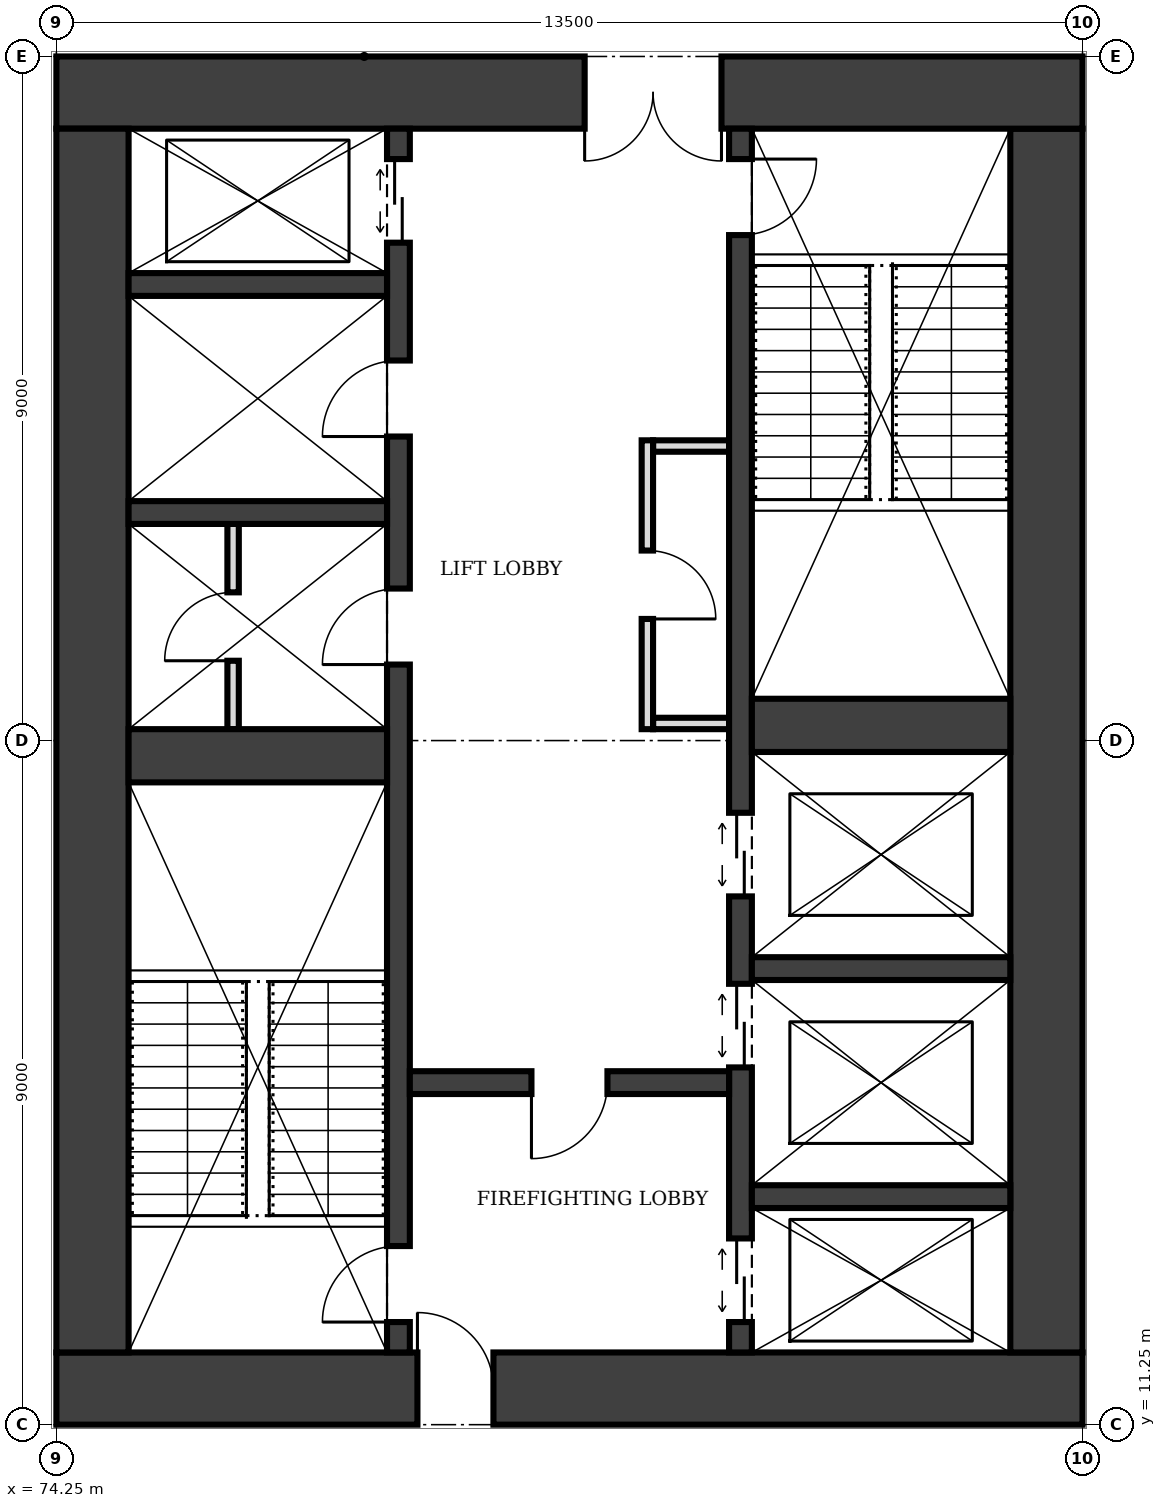
"""IFC4 building model, lengths in metres.
Left out: names, types, materials, properties, quantities, classifications, styles, units other than length and angle.
Written with IfcOpenShell. Run it as: python <this file> out.ifc"""

import sys

from ifc_helpers import new_model, si_unit, direction, frame, frame_2d, origin, place, context, subcontext, project, spatial, rectangle, extrude, element, fill, save


model = new_model("IFC4")
c1 = context("Model", 3, precision=1e-05, world=origin(), true_north=direction((0.0, 1.0)))
c2 = subcontext(c1, "Body", "Model", "MODEL_VIEW")
j1 = project(units=[si_unit("LENGTHUNIT", "METRE"), si_unit("PLANEANGLEUNIT", "RADIAN")], contexts=[c1])
p1 = place(None, origin())
s1 = spatial("IfcSite", under=j1, at=p1, CompositionType="ELEMENT")
p2 = place(p1, origin())
s2 = spatial("IfcBuilding", under=s1, at=p2, CompositionType="ELEMENT")
p3 = place(p2, frame((0.0, 0.0, 129.0)))
s3 = spatial("IfcBuildingStorey", under=s2, at=p3, CompositionType="ELEMENT", Elevation=129.0)
p4 = place(p3, frame((74.25, 11.725, 0.0), z_axis=(0.0, 0.0, 1.0), x_axis=(1.0, 0.0, 0.0)))
e1 = element("IfcWall", 1, at=p4, inside=s3, PredefinedType="SHEAR", context=c2, shape_type="SweptSolid", body=[
    extrude(rectangle(XDim=13.5, YDim=0.95, at=frame_2d((6.75, 0.0))), origin(), (0.0, 0.0, 1.0), 4.0),
])
p5 = place(p4, frame((4.75, 0.0, 0.0)))
e2 = element("IfcOpeningElement", 2, at=p5, cuts=e1, PredefinedType="OPENING", context=c2, shape_type="SweptSolid", body=[
    extrude(rectangle(XDim=1.0, YDim=2.1, at=frame_2d((0.5, 1.05))), frame((0.0, 0.485, 0.0), z_axis=(0.0, -1.0, 0.0), x_axis=(1.0, 0.0, 0.0)), (0.0, 0.0, 1.0), 0.97),
])
p6 = place(p3, frame((87.275, 12.2, 0.0), z_axis=(0.0, 0.0, 1.0), x_axis=(0.0, 1.0, 0.0)))
e3 = element("IfcWall", 3, at=p6, inside=s3, PredefinedType="SHEAR", context=c2, shape_type="SweptSolid", body=[
    extrude(rectangle(XDim=16.1, YDim=0.95, at=frame_2d((8.05, 0.0))), origin(), (0.0, 0.0, 1.0), 4.0),
])
p7 = place(p3, frame((87.75, 28.775, 0.0), z_axis=(0.0, 0.0, 1.0), x_axis=(-1.0, 0.0, 0.0)))
e4 = element("IfcWall", 4, at=p7, inside=s3, PredefinedType="SHEAR", context=c2, shape_type="SweptSolid", body=[
    extrude(rectangle(XDim=13.5, YDim=0.95, at=frame_2d((6.75, 0.0))), origin(), (0.0, 0.0, 1.0), 4.0),
])
p8 = place(p7, frame((4.75, 0.0, 0.0)))
e5 = element("IfcOpeningElement", 5, at=p8, cuts=e4, PredefinedType="OPENING", context=c2, shape_type="SweptSolid", body=[
    extrude(rectangle(XDim=1.8, YDim=2.1, at=frame_2d((0.9, 1.05))), frame((0.0, 0.485, 0.0), z_axis=(0.0, -1.0, 0.0), x_axis=(1.0, 0.0, 0.0)), (0.0, 0.0, 1.0), 0.97),
])
p9 = place(p3, frame((74.725, 28.3, 0.0), z_axis=(0.0, 0.0, 1.0), x_axis=(0.0, -1.0, 0.0)))
e6 = element("IfcWall", 6, at=p9, inside=s3, PredefinedType="SHEAR", context=c2, shape_type="SweptSolid", body=[
    extrude(rectangle(XDim=16.1, YDim=0.95, at=frame_2d((8.05, 0.0))), origin(), (0.0, 0.0, 1.0), 4.0),
])
p10 = place(p3, frame((78.75, 12.2, 0.0), z_axis=(0.0, 0.0, 1.0), x_axis=(0.0, 1.0, 0.0)))
e7 = element("IfcWall", 7, at=p10, inside=s3, PredefinedType="SHEAR", context=c2, shape_type="SweptSolid", body=[
    extrude(rectangle(XDim=16.1, YDim=0.3, at=frame_2d((8.05, 0.0))), origin(), (0.0, 0.0, 1.0), 4.0),
])
p11 = place(p10, frame((0.4, 0.0, 0.0)))
e8 = element("IfcOpeningElement", 8, at=p11, cuts=e7, PredefinedType="OPENING", context=c2, shape_type="SweptSolid", body=[
    extrude(rectangle(XDim=1.0, YDim=2.1, at=frame_2d((0.5, 1.05))), frame((0.0, 0.16, 0.0), z_axis=(0.0, -1.0, 0.0), x_axis=(1.0, 0.0, 0.0)), (0.0, 0.0, 1.0), 0.32),
])
p12 = place(p10, frame((14.6, 0.0, 0.0)))
e9 = element("IfcOpeningElement", 9, at=p12, cuts=e7, PredefinedType="OPENING", context=c2, shape_type="SweptSolid", body=[
    extrude(rectangle(XDim=1.1, YDim=2.1, at=frame_2d((0.55, 1.05))), frame((0.0, 0.16, 0.0), z_axis=(0.0, -1.0, 0.0), x_axis=(1.0, 0.0, 0.0)), (0.0, 0.0, 1.0), 0.32),
])
p13 = place(p10, frame((9.05, 0.0, 0.0)))
e10 = element("IfcOpeningElement", 10, at=p13, cuts=e7, PredefinedType="OPENING", context=c2, shape_type="SweptSolid", body=[
    extrude(rectangle(XDim=1.0, YDim=2.1, at=frame_2d((0.5, 1.05))), frame((0.0, 0.16, 0.0), z_axis=(0.0, -1.0, 0.0), x_axis=(1.0, 0.0, 0.0)), (0.0, 0.0, 1.0), 0.32),
])
p14 = place(p10, frame((12.05, 0.0, 0.0)))
e11 = element("IfcOpeningElement", 11, at=p14, cuts=e7, PredefinedType="OPENING", context=c2, shape_type="SweptSolid", body=[
    extrude(rectangle(XDim=1.0, YDim=2.1, at=frame_2d((0.5, 1.05))), frame((0.0, 0.16, 0.0), z_axis=(0.0, -1.0, 0.0), x_axis=(1.0, 0.0, 0.0)), (0.0, 0.0, 1.0), 0.32),
])
p15 = place(p3, frame((83.25, 12.2, 0.0), z_axis=(0.0, 0.0, 1.0), x_axis=(0.0, 1.0, 0.0)))
e12 = element("IfcWall", 12, at=p15, inside=s3, PredefinedType="SHEAR", context=c2, shape_type="SweptSolid", body=[
    extrude(rectangle(XDim=16.1, YDim=0.3, at=frame_2d((8.05, 0.0))), origin(), (0.0, 0.0, 1.0), 4.0),
])
p16 = place(p15, frame((14.7, 0.0, 0.0)))
e13 = element("IfcOpeningElement", 13, at=p16, cuts=e12, PredefinedType="OPENING", context=c2, shape_type="SweptSolid", body=[
    extrude(rectangle(XDim=1.0, YDim=2.1, at=frame_2d((0.5, 1.05))), frame((0.0, 0.16, 0.0), z_axis=(0.0, -1.0, 0.0), x_axis=(1.0, 0.0, 0.0)), (0.0, 0.0, 1.0), 0.32),
])
p17 = place(p15, frame((0.4, 0.0, 0.0)))
e14 = element("IfcOpeningElement", 14, at=p17, cuts=e12, PredefinedType="OPENING", context=c2, shape_type="SweptSolid", body=[
    extrude(rectangle(XDim=1.1, YDim=2.1, at=frame_2d((0.55, 1.05))), frame((0.0, 0.16, 0.0), z_axis=(0.0, -1.0, 0.0), x_axis=(1.0, 0.0, 0.0)), (0.0, 0.0, 1.0), 0.32),
])
p18 = place(p15, frame((3.75, 0.0, 0.0)))
e15 = element("IfcOpeningElement", 15, at=p18, cuts=e12, PredefinedType="OPENING", context=c2, shape_type="SweptSolid", body=[
    extrude(rectangle(XDim=1.1, YDim=2.1, at=frame_2d((0.55, 1.05))), frame((0.0, 0.16, 0.0), z_axis=(0.0, -1.0, 0.0), x_axis=(1.0, 0.0, 0.0)), (0.0, 0.0, 1.0), 0.32),
])
p19 = place(p15, frame((6.0, 0.0, 0.0)))
e16 = element("IfcOpeningElement", 16, at=p19, cuts=e12, PredefinedType="OPENING", context=c2, shape_type="SweptSolid", body=[
    extrude(rectangle(XDim=1.1, YDim=2.1, at=frame_2d((0.55, 1.05))), frame((0.0, 0.16, 0.0), z_axis=(0.0, -1.0, 0.0), x_axis=(1.0, 0.0, 0.0)), (0.0, 0.0, 1.0), 0.32),
])
p20 = place(p3, frame((75.2, 20.05, 0.0), z_axis=(0.0, 0.0, 1.0), x_axis=(1.0, 0.0, 0.0)))
e17 = element("IfcWall", 17, at=p20, inside=s3, PredefinedType="SHEAR", context=c2, shape_type="SweptSolid", body=[
    extrude(rectangle(XDim=3.4, YDim=0.7, at=frame_2d((1.7, 0.0))), origin(), (0.0, 0.0, 1.0), 4.0),
])
p21 = place(p3, frame((78.9, 15.75, 0.0), z_axis=(0.0, 0.0, 1.0), x_axis=(1.0, 0.0, 0.0)))
e18 = element("IfcWall", 18, at=p21, inside=s3, PredefinedType="SHEAR", context=c2, shape_type="SweptSolid", body=[
    extrude(rectangle(XDim=4.2, YDim=0.3, at=frame_2d((2.1, 0.0))), origin(), (0.0, 0.0, 1.0), 4.0),
])
p22 = place(p21, frame((1.6, 0.0, 0.0)))
e19 = element("IfcOpeningElement", 19, at=p22, cuts=e18, PredefinedType="OPENING", context=c2, shape_type="SweptSolid", body=[
    extrude(rectangle(XDim=1.0, YDim=2.1, at=frame_2d((0.5, 1.05))), frame((0.0, 0.16, 0.0), z_axis=(0.0, -1.0, 0.0), x_axis=(1.0, 0.0, 0.0)), (0.0, 0.0, 1.0), 0.32),
])
for number, where, z_axis, x_axis in (
    (20, (83.4, 14.25, 0.0), (0.0, 0.0, 1.0), (1.0, 0.0, 0.0)),
    (21, (83.4, 17.25, 0.0), (0.0, 0.0, 1.0), (1.0, 0.0, 0.0)),
):
    element("IfcWall", number, at=place(p3, frame(where, z_axis=z_axis, x_axis=x_axis)), inside=s3, PredefinedType="SHEAR", context=c2, shape_type="SweptSolid", body=[
        extrude(rectangle(XDim=3.4, YDim=0.3, at=frame_2d((1.7, 0.0))), origin(), (0.0, 0.0, 1.0), 4.0),
    ])
p23 = place(p3, frame((83.4, 20.45, 0.0), z_axis=(0.0, 0.0, 1.0), x_axis=(1.0, 0.0, 0.0)))
e22 = element("IfcWall", 22, at=p23, inside=s3, PredefinedType="SHEAR", context=c2, shape_type="SweptSolid", body=[
    extrude(rectangle(XDim=3.4, YDim=0.7, at=frame_2d((1.7, 0.0))), origin(), (0.0, 0.0, 1.0), 4.0),
])
for number, where, z_axis, x_axis in (
    (23, (75.2, 23.25, 0.0), (0.0, 0.0, 1.0), (1.0, 0.0, 0.0)),
    (24, (75.2, 26.25, 0.0), (0.0, 0.0, 1.0), (1.0, 0.0, 0.0)),
):
    element("IfcWall", number, at=place(p3, frame(where, z_axis=z_axis, x_axis=x_axis)), inside=s3, PredefinedType="SHEAR", context=c2, shape_type="SweptSolid", body=[
        extrude(rectangle(XDim=3.4, YDim=0.3, at=frame_2d((1.7, 0.0))), origin(), (0.0, 0.0, 1.0), 4.0),
    ])
p24 = place(p3, frame((82.025, 20.4, 0.0), z_axis=(0.0, 0.0, 1.0), x_axis=(0.0, 1.0, 0.0)))
e25 = element("IfcWall", 25, at=p24, inside=s3, PredefinedType="PARTITIONING", context=c2, shape_type="SweptSolid", body=[
    extrude(rectangle(XDim=3.8, YDim=0.15, at=frame_2d((1.9, 0.0))), origin(), (0.0, 0.0, 1.0), 3.75),
])
p25 = place(p24, frame((1.45, 0.0, 0.0)))
e26 = element("IfcOpeningElement", 26, at=p25, cuts=e25, PredefinedType="OPENING", context=c2, shape_type="SweptSolid", body=[
    extrude(rectangle(XDim=0.9, YDim=2.1, at=frame_2d((0.45, 1.05))), frame((0.0, 0.085, 0.0), z_axis=(0.0, -1.0, 0.0), x_axis=(1.0, 0.0, 0.0)), (0.0, 0.0, 1.0), 0.17),
])
for number, where, z_axis, x_axis in (
    (27, (82.1, 20.475, 0.0), (0.0, 0.0, 1.0), (1.0, 0.0, 0.0)),
    (28, (82.1, 24.125, 0.0), (0.0, 0.0, 1.0), (1.0, 0.0, 0.0)),
):
    element("IfcWall", number, at=place(p3, frame(where, z_axis=z_axis, x_axis=x_axis)), inside=s3, PredefinedType="PARTITIONING", context=c2, shape_type="SweptSolid", body=[
        extrude(rectangle(XDim=1.0, YDim=0.15, at=frame_2d((0.5, 0.0))), origin(), (0.0, 0.0, 1.0), 3.75),
    ])
p26 = place(p3, frame((76.575, 20.4, 0.0), z_axis=(0.0, 0.0, 1.0), x_axis=(0.0, 1.0, 0.0)))
e29 = element("IfcWall", 29, at=p26, inside=s3, PredefinedType="PARTITIONING", context=c2, shape_type="SweptSolid", body=[
    extrude(rectangle(XDim=2.7, YDim=0.15, at=frame_2d((1.35, 0.0))), origin(), (0.0, 0.0, 1.0), 3.75),
])
p27 = place(p26, frame((0.9, 0.0, 0.0)))
e30 = element("IfcOpeningElement", 30, at=p27, cuts=e29, PredefinedType="OPENING", context=c2, shape_type="SweptSolid", body=[
    extrude(rectangle(XDim=0.9, YDim=2.1, at=frame_2d((0.45, 1.05))), frame((0.0, 0.085, 0.0), z_axis=(0.0, -1.0, 0.0), x_axis=(1.0, 0.0, 0.0)), (0.0, 0.0, 1.0), 0.17),
])
p28 = place(p5, origin())
e31 = element("IfcDoor", 31, at=p28, inside=s3, OperationType="SINGLE_SWING_LEFT", PredefinedType="DOOR", context=c2, shape_type="SweptSolid", body=[
    extrude(rectangle(XDim=1.0, YDim=2.1, at=frame_2d((0.5, 1.05))), frame((0.0, 0.025, 0.0), z_axis=(0.0, -1.0, 0.0), x_axis=(1.0, 0.0, 0.0)), (0.0, 0.0, 1.0), 0.05),
])
fill(e2, e31)
p29 = place(p8, origin())
e32 = element("IfcDoor", 32, at=p29, inside=s3, OperationType="DOUBLE_DOOR_SINGLE_SWING", PredefinedType="DOOR", context=c2, shape_type="SweptSolid", body=[
    extrude(rectangle(XDim=1.8, YDim=2.1, at=frame_2d((0.9, 1.05))), frame((0.0, 0.025, 0.0), z_axis=(0.0, -1.0, 0.0), x_axis=(1.0, 0.0, 0.0)), (0.0, 0.0, 1.0), 0.05),
])
fill(e5, e32)
p30 = place(p22, frame((1.0, 0.0, 0.0), z_axis=(0.0, 0.0, 1.0), x_axis=(-1.0, 0.0, 0.0)))
e33 = element("IfcDoor", 33, at=p30, inside=s3, OperationType="SINGLE_SWING_RIGHT", PredefinedType="DOOR", context=c2, shape_type="SweptSolid", body=[
    extrude(rectangle(XDim=1.0, YDim=2.1, at=frame_2d((0.5, 1.05))), frame((0.0, 0.025, 0.0), z_axis=(0.0, -1.0, 0.0), x_axis=(1.0, 0.0, 0.0)), (0.0, 0.0, 1.0), 0.05),
])
fill(e19, e33)
p31 = place(p11, origin())
e34 = element("IfcDoor", 34, at=p31, inside=s3, OperationType="SINGLE_SWING_LEFT", PredefinedType="DOOR", context=c2, shape_type="SweptSolid", body=[
    extrude(rectangle(XDim=1.0, YDim=2.1, at=frame_2d((0.5, 1.05))), frame((0.0, 0.025, 0.0), z_axis=(0.0, -1.0, 0.0), x_axis=(1.0, 0.0, 0.0)), (0.0, 0.0, 1.0), 0.05),
])
fill(e8, e34)
p32 = place(p16, frame((1.0, 0.0, 0.0), z_axis=(0.0, 0.0, 1.0), x_axis=(-1.0, 0.0, 0.0)))
e35 = element("IfcDoor", 35, at=p32, inside=s3, OperationType="SINGLE_SWING_LEFT", PredefinedType="DOOR", context=c2, shape_type="SweptSolid", body=[
    extrude(rectangle(XDim=1.0, YDim=2.1, at=frame_2d((0.5, 1.05))), frame((0.0, 0.025, 0.0), z_axis=(0.0, -1.0, 0.0), x_axis=(1.0, 0.0, 0.0)), (0.0, 0.0, 1.0), 0.05),
])
fill(e13, e35)
p33 = place(p17, origin())
e36 = element("IfcDoor", 36, at=p33, inside=s3, OperationType="DOUBLE_DOOR_SLIDING", PredefinedType="DOOR", context=c2, shape_type="SweptSolid", body=[
    extrude(rectangle(XDim=1.1, YDim=2.1, at=frame_2d((0.55, 1.05))), frame((0.0, 0.025, 0.0), z_axis=(0.0, -1.0, 0.0), x_axis=(1.0, 0.0, 0.0)), (0.0, 0.0, 1.0), 0.05),
])
fill(e14, e36)
p34 = place(p12, origin())
e37 = element("IfcDoor", 37, at=p34, inside=s3, OperationType="DOUBLE_DOOR_SLIDING", PredefinedType="DOOR", context=c2, shape_type="SweptSolid", body=[
    extrude(rectangle(XDim=1.1, YDim=2.1, at=frame_2d((0.55, 1.05))), frame((0.0, 0.025, 0.0), z_axis=(0.0, -1.0, 0.0), x_axis=(1.0, 0.0, 0.0)), (0.0, 0.0, 1.0), 0.05),
])
fill(e9, e37)
p35 = place(p18, origin())
e38 = element("IfcDoor", 38, at=p35, inside=s3, OperationType="DOUBLE_DOOR_SLIDING", PredefinedType="DOOR", context=c2, shape_type="SweptSolid", body=[
    extrude(rectangle(XDim=1.1, YDim=2.1, at=frame_2d((0.55, 1.05))), frame((0.0, 0.025, 0.0), z_axis=(0.0, -1.0, 0.0), x_axis=(1.0, 0.0, 0.0)), (0.0, 0.0, 1.0), 0.05),
])
fill(e15, e38)
p36 = place(p19, origin())
e39 = element("IfcDoor", 39, at=p36, inside=s3, OperationType="DOUBLE_DOOR_SLIDING", PredefinedType="DOOR", context=c2, shape_type="SweptSolid", body=[
    extrude(rectangle(XDim=1.1, YDim=2.1, at=frame_2d((0.55, 1.05))), frame((0.0, 0.025, 0.0), z_axis=(0.0, -1.0, 0.0), x_axis=(1.0, 0.0, 0.0)), (0.0, 0.0, 1.0), 0.05),
])
fill(e16, e39)
p37 = place(p25, frame((0.9, 0.0, 0.0), z_axis=(0.0, 0.0, 1.0), x_axis=(-1.0, 0.0, 0.0)))
e40 = element("IfcDoor", 40, at=p37, inside=s3, OperationType="SINGLE_SWING_RIGHT", PredefinedType="DOOR", context=c2, shape_type="SweptSolid", body=[
    extrude(rectangle(XDim=0.9, YDim=2.1, at=frame_2d((0.45, 1.05))), frame((0.0, 0.025, 0.0), z_axis=(0.0, -1.0, 0.0), x_axis=(1.0, 0.0, 0.0)), (0.0, 0.0, 1.0), 0.05),
])
fill(e26, e40)
p38 = place(p13, origin())
e41 = element("IfcDoor", 41, at=p38, inside=s3, OperationType="SINGLE_SWING_LEFT", PredefinedType="DOOR", context=c2, shape_type="SweptSolid", body=[
    extrude(rectangle(XDim=1.0, YDim=2.1, at=frame_2d((0.5, 1.05))), frame((0.0, 0.025, 0.0), z_axis=(0.0, -1.0, 0.0), x_axis=(1.0, 0.0, 0.0)), (0.0, 0.0, 1.0), 0.05),
])
fill(e10, e41)
p39 = place(p27, origin())
e42 = element("IfcDoor", 42, at=p39, inside=s3, OperationType="SINGLE_SWING_LEFT", PredefinedType="DOOR", context=c2, shape_type="SweptSolid", body=[
    extrude(rectangle(XDim=0.9, YDim=2.1, at=frame_2d((0.45, 1.05))), frame((0.0, 0.025, 0.0), z_axis=(0.0, -1.0, 0.0), x_axis=(1.0, 0.0, 0.0)), (0.0, 0.0, 1.0), 0.05),
])
fill(e30, e42)
p40 = place(p14, origin())
e43 = element("IfcDoor", 43, at=p40, inside=s3, OperationType="SINGLE_SWING_LEFT", PredefinedType="DOOR", context=c2, shape_type="SweptSolid", body=[
    extrude(rectangle(XDim=1.0, YDim=2.1, at=frame_2d((0.5, 1.05))), frame((0.0, 0.025, 0.0), z_axis=(0.0, -1.0, 0.0), x_axis=(1.0, 0.0, 0.0)), (0.0, 0.0, 1.0), 0.05),
])
fill(e11, e43)
save(model, sys.argv[1])
